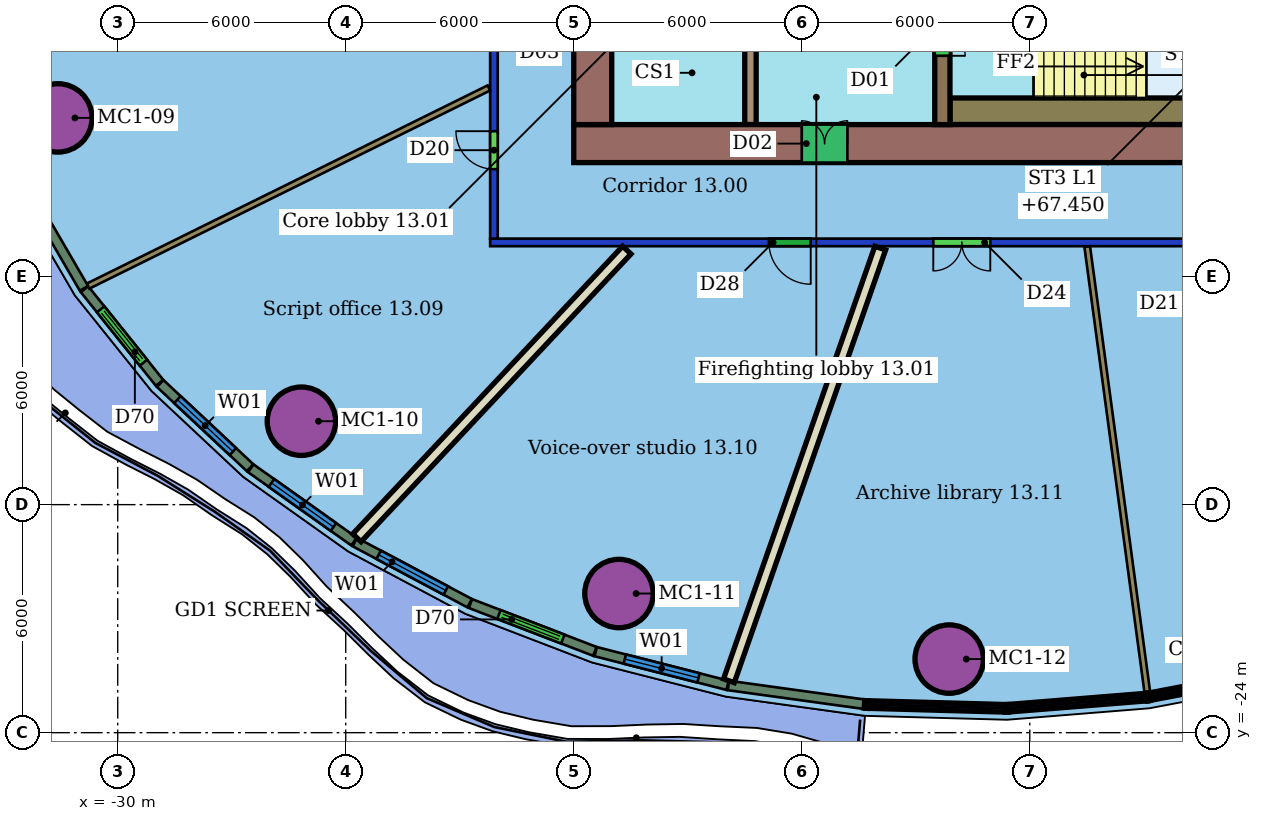
"""IFC4 building model, lengths in metres.
Left out: names, types, materials, properties, quantities, classifications, styles, units other than length and angle.
Written with IfcOpenShell. Run it as: python <this file> out.ifc"""

import sys

from ifc_helpers import new_model, si_unit, direction, frame, frame_2d, origin, origin_2d, place, context, subcontext, project, spatial, rectangle, hollow_circle, extrude, element, fill, save


model = new_model("IFC4")
c1 = context("Model", 3, precision=1e-05, world=origin(), true_north=direction((0.0, 1.0)))
c2 = subcontext(c1, "Body", "Model", "MODEL_VIEW")
j1 = project(units=[si_unit("LENGTHUNIT", "METRE"), si_unit("PLANEANGLEUNIT", "RADIAN")], contexts=[c1])
p1 = place(None, origin())
s1 = spatial("IfcSite", under=j1, at=p1, CompositionType="ELEMENT")
p2 = place(p1, origin())
s2 = spatial("IfcBuilding", under=s1, at=p2, CompositionType="ELEMENT")
p3 = place(p2, frame((0.0, 0.0, 65.6)))
s3 = spatial("IfcBuildingStorey", under=s2, at=p3, CompositionType="ELEMENT", Elevation=65.6)
for number, where, z_axis, x_axis in (
    (1, (-31.575, -7.824, 0.0), (0.0, 0.0, 1.0), (1.0, 0.0, 0.0)),
    (2, (-25.166, -15.805, 0.0), (0.0, 0.0, 1.0), (1.0, 0.0, 0.0)),
    (3, (-16.81, -20.339, 0.0), (0.0, 0.0, 1.0), (1.0, 0.0, 0.0)),
    (4, (-8.121, -22.064, 0.0), (0.0, 0.0, 1.0), (1.0, 0.0, 0.0)),
):
    element("IfcColumn", number, at=place(p3, frame(where, z_axis=z_axis, x_axis=x_axis)), inside=s3, PredefinedType="COLUMN", context=c2, shape_type="SweptSolid", body=[
        extrude(hollow_circle(Radius=0.9, WallThickness=0.06, at=origin_2d()), origin(), (0.0, 0.0, 1.0), 3.55),
    ])
p4 = place(p3, frame((8.2, -11.1, 0.0), z_axis=(0.0, 0.0, 1.0), x_axis=(-1.0, 0.0, 0.0)))
e5 = element("IfcWall", 5, at=p4, inside=s3, PredefinedType="PARTITIONING", context=c2, shape_type="SweptSolid", body=[
    extrude(rectangle(XDim=28.4, YDim=0.2, at=frame_2d((14.2, 0.0))), origin(), (0.0, 0.0, 1.0), 2.85),
])
p5 = place(p4, frame((19.964, 0.0, 0.0)))
e6 = element("IfcOpeningElement", 6, at=p5, cuts=e5, PredefinedType="OPENING", context=c2, shape_type="SweptSolid", body=[
    extrude(rectangle(XDim=1.1, YDim=2.1, at=frame_2d((0.55, 1.05))), frame((0.0, 0.11, 0.0), z_axis=(0.0, -1.0, 0.0), x_axis=(1.0, 0.0, 0.0)), (0.0, 0.0, 1.0), 0.22),
])
p6 = place(p4, frame((15.239, 0.0, 0.0)))
e7 = element("IfcOpeningElement", 7, at=p6, cuts=e5, PredefinedType="OPENING", context=c2, shape_type="SweptSolid", body=[
    extrude(rectangle(XDim=1.5, YDim=2.1, at=frame_2d((0.75, 1.05))), frame((0.0, 0.11, 0.0), z_axis=(0.0, -1.0, 0.0), x_axis=(1.0, 0.0, 0.0)), (0.0, 0.0, 1.0), 0.22),
])
p7 = place(p4, frame((7.453, 0.0, 0.0)))
e8 = element("IfcOpeningElement", 8, at=p7, cuts=e5, PredefinedType="OPENING", context=c2, shape_type="SweptSolid", body=[
    extrude(rectangle(XDim=1.8, YDim=2.1, at=frame_2d((0.9, 1.05))), frame((0.0, 0.11, 0.0), z_axis=(0.0, -1.0, 0.0), x_axis=(1.0, 0.0, 0.0)), (0.0, 0.0, 1.0), 0.22),
])
p8 = place(p3, frame((-20.1, -11.0, 0.0), z_axis=(0.0, 0.0, 1.0), x_axis=(0.0, 1.0, 0.0)))
e9 = element("IfcWall", 9, at=p8, inside=s3, PredefinedType="PARTITIONING", context=c2, shape_type="SweptSolid", body=[
    extrude(rectangle(XDim=22.0, YDim=0.2, at=frame_2d((11.0, 0.0))), origin(), (0.0, 0.0, 1.0), 2.85),
])
p9 = place(p8, frame((18.78, 0.0, 0.0)))
e10 = element("IfcOpeningElement", 10, at=p9, cuts=e9, PredefinedType="OPENING", context=c2, shape_type="SweptSolid", body=[
    extrude(rectangle(XDim=0.9, YDim=2.1, at=frame_2d((0.45, 1.05))), frame((0.0, 0.11, 0.0), z_axis=(0.0, -1.0, 0.0), x_axis=(1.0, 0.0, 0.0)), (0.0, 0.0, 1.0), 0.22),
])
p10 = place(p8, frame((14.403, 0.0, 0.0)))
e11 = element("IfcOpeningElement", 11, at=p10, cuts=e9, PredefinedType="OPENING", context=c2, shape_type="SweptSolid", body=[
    extrude(rectangle(XDim=1.1, YDim=2.1, at=frame_2d((0.55, 1.05))), frame((0.0, 0.11, 0.0), z_axis=(0.0, -1.0, 0.0), x_axis=(1.0, 0.0, 0.0)), (0.0, 0.0, 1.0), 0.22),
])
p11 = place(p8, frame((5.9, 0.0, 0.0)))
e12 = element("IfcOpeningElement", 12, at=p11, cuts=e9, PredefinedType="OPENING", context=c2, shape_type="SweptSolid", body=[
    extrude(rectangle(XDim=0.9, YDim=2.1, at=frame_2d((0.45, 1.05))), frame((0.0, 0.11, 0.0), z_axis=(0.0, -1.0, 0.0), x_axis=(1.0, 0.0, 0.0)), (0.0, 0.0, 1.0), 0.22),
])
p12 = place(p8, frame((1.826, 0.0, 0.0)))
e13 = element("IfcOpeningElement", 13, at=p12, cuts=e9, PredefinedType="OPENING", context=c2, shape_type="SweptSolid", body=[
    extrude(rectangle(XDim=1.0, YDim=2.1, at=frame_2d((0.5, 1.05))), frame((0.0, 0.11, 0.0), z_axis=(0.0, -1.0, 0.0), x_axis=(1.0, 0.0, 0.0)), (0.0, 0.0, 1.0), 0.22),
])
p13 = place(p3, frame((-30.78, -12.25, 0.0), z_axis=(0.0, 0.0, 1.0), x_axis=(0.89644340997, 0.443158225379, 0.0)))
e14 = element("IfcWall", 14, at=p13, inside=s3, PredefinedType="PARTITIONING", context=c2, shape_type="SweptSolid", body=[
    extrude(rectangle(XDim=11.765, YDim=0.15, at=frame_2d((5.882, 0.0))), origin(), (0.0, 0.0, 1.0), 3.55),
])
p14 = place(p3, frame((-23.706, -18.873, 0.0), z_axis=(0.0, 0.0, 1.0), x_axis=(0.684203954535, 0.729290716106, 0.0)))
e15 = element("IfcWall", 15, at=p14, inside=s3, PredefinedType="PARTITIONING", context=c2, shape_type="SweptSolid", body=[
    extrude(rectangle(XDim=10.38, YDim=0.3, at=frame_2d((5.19, 0.0))), origin(), (0.0, 0.0, 1.0), 3.55),
])
p15 = place(p3, frame((-13.917, -22.634, 0.0), z_axis=(0.0, 0.0, 1.0), x_axis=(0.330154755406, 0.943926817864, 0.0)))
e16 = element("IfcWall", 16, at=p15, inside=s3, PredefinedType="PARTITIONING", context=c2, shape_type="SweptSolid", body=[
    extrude(rectangle(XDim=12.061, YDim=0.3, at=frame_2d((6.03, 0.0))), origin(), (0.0, 0.0, 1.0), 3.55),
])
p16 = place(p3, frame((-2.907, -22.937, 0.0), z_axis=(0.0, 0.0, 1.0), x_axis=(-0.133632581672, 0.99103094458, 0.0)))
e17 = element("IfcWall", 17, at=p16, inside=s3, PredefinedType="PARTITIONING", context=c2, shape_type="SweptSolid", body=[
    extrude(rectangle(XDim=11.833, YDim=0.15, at=frame_2d((5.917, 0.0))), origin(), (0.0, 0.0, 1.0), 3.55),
])
p17 = place(p3, frame((-32.421, -9.676, 0.0), z_axis=(0.0, 0.0, 1.0), x_axis=(0.502779258101, -0.864414841163, 0.0)))
e18 = element("IfcWall", 18, at=p17, inside=s3, PredefinedType="SOLIDWALL", context=c2, shape_type="SweptSolid", body=[
    extrude(rectangle(XDim=3.046, YDim=0.25, at=frame_2d((1.523, 0.0))), origin(), (0.0, 0.0, 1.0), 3.15),
])
p18 = place(p3, frame((-30.874, -12.331, 0.0), z_axis=(0.0, 0.0, 1.0), x_axis=(0.625543346061, -0.780189414308, 0.0)))
e19 = element("IfcWall", 19, at=p18, inside=s3, PredefinedType="SOLIDWALL", context=c2, shape_type="SweptSolid", body=[
    extrude(rectangle(XDim=3.157, YDim=0.25, at=frame_2d((1.579, 0.0))), origin(), (0.0, 0.0, 1.0), 3.15),
])
p19 = place(p18, frame((0.679, 0.0, 0.0)))
e20 = element("IfcOpeningElement", 20, at=p19, cuts=e19, PredefinedType="OPENING", context=c2, shape_type="SweptSolid", body=[
    extrude(rectangle(XDim=1.8, YDim=2.4, at=frame_2d((0.9, 1.2))), frame((0.0, 0.135, 0.0), z_axis=(0.0, -1.0, 0.0), x_axis=(1.0, 0.0, 0.0)), (0.0, 0.0, 1.0), 0.27),
])
p20 = place(p3, frame((-28.882, -14.813, 0.0), z_axis=(0.0, 0.0, 1.0), x_axis=(0.729856637525, -0.68360024039, 0.0)))
e21 = element("IfcWall", 21, at=p20, inside=s3, PredefinedType="SOLIDWALL", context=c2, shape_type="SweptSolid", body=[
    extrude(rectangle(XDim=3.241, YDim=0.25, at=frame_2d((1.62, 0.0))), origin(), (0.0, 0.0, 1.0), 3.15),
])
p21 = place(p20, frame((0.62, 0.0, 0.8)))
e22 = element("IfcOpeningElement", 22, at=p21, cuts=e21, PredefinedType="OPENING", context=c2, shape_type="SweptSolid", body=[
    extrude(rectangle(XDim=2.0, YDim=2.2, at=frame_2d((1.0, 1.1))), frame((0.0, 0.135, 0.0), z_axis=(0.0, -1.0, 0.0), x_axis=(1.0, 0.0, 0.0)), (0.0, 0.0, 1.0), 0.27),
])
p22 = place(p3, frame((-26.497, -17.044, 0.0), z_axis=(0.0, 0.0, 1.0), x_axis=(0.815374335275, -0.578934101064, 0.0)))
e23 = element("IfcWall", 23, at=p22, inside=s3, PredefinedType="SOLIDWALL", context=c2, shape_type="SweptSolid", body=[
    extrude(rectangle(XDim=3.331, YDim=0.25, at=frame_2d((1.666, 0.0))), origin(), (0.0, 0.0, 1.0), 3.15),
])
p23 = place(p22, frame((0.666, 0.0, 0.8)))
e24 = element("IfcOpeningElement", 24, at=p23, cuts=e23, PredefinedType="OPENING", context=c2, shape_type="SweptSolid", body=[
    extrude(rectangle(XDim=2.0, YDim=2.2, at=frame_2d((1.0, 1.1))), frame((0.0, 0.135, 0.0), z_axis=(0.0, -1.0, 0.0), x_axis=(1.0, 0.0, 0.0)), (0.0, 0.0, 1.0), 0.27),
])
p24 = place(p3, frame((-23.761, -18.985, 0.0), z_axis=(0.0, 0.0, 1.0), x_axis=(0.882781118704, -0.469784521308, 0.0)))
e25 = element("IfcWall", 25, at=p24, inside=s3, PredefinedType="SOLIDWALL", context=c2, shape_type="SweptSolid", body=[
    extrude(rectangle(XDim=3.422, YDim=0.25, at=frame_2d((1.711, 0.0))), origin(), (0.0, 0.0, 1.0), 3.15),
])
p25 = place(p24, frame((0.711, 0.0, 0.8)))
e26 = element("IfcOpeningElement", 26, at=p25, cuts=e25, PredefinedType="OPENING", context=c2, shape_type="SweptSolid", body=[
    extrude(rectangle(XDim=2.0, YDim=2.2, at=frame_2d((1.0, 1.1))), frame((0.0, 0.135, 0.0), z_axis=(0.0, -1.0, 0.0), x_axis=(1.0, 0.0, 0.0)), (0.0, 0.0, 1.0), 0.27),
])
p26 = place(p3, frame((-20.719, -20.603, 0.0), z_axis=(0.0, 0.0, 1.0), x_axis=(0.933440649203, -0.358731869808, 0.0)))
e27 = element("IfcWall", 27, at=p26, inside=s3, PredefinedType="SOLIDWALL", context=c2, shape_type="SweptSolid", body=[
    extrude(rectangle(XDim=3.508, YDim=0.25, at=frame_2d((1.754, 0.0))), origin(), (0.0, 0.0, 1.0), 3.15),
])
p27 = place(p26, frame((0.804, 0.0, 0.0)))
e28 = element("IfcOpeningElement", 28, at=p27, cuts=e27, PredefinedType="OPENING", context=c2, shape_type="SweptSolid", body=[
    extrude(rectangle(XDim=1.8, YDim=2.4, at=frame_2d((0.9, 1.2))), frame((0.0, 0.135, 0.0), z_axis=(0.0, -1.0, 0.0), x_axis=(1.0, 0.0, 0.0)), (0.0, 0.0, 1.0), 0.27),
])
p28 = place(p3, frame((-17.423, -21.868, 0.0), z_axis=(0.0, 0.0, 1.0), x_axis=(0.968907631907, -0.24742271689, 0.0)))
e29 = element("IfcWall", 29, at=p28, inside=s3, PredefinedType="SOLIDWALL", context=c2, shape_type="SweptSolid", body=[
    extrude(rectangle(XDim=3.583, YDim=0.25, at=frame_2d((1.792, 0.0))), origin(), (0.0, 0.0, 1.0), 3.15),
])
p29 = place(p28, frame((0.791, 0.0, 0.8)))
e30 = element("IfcOpeningElement", 30, at=p29, cuts=e29, PredefinedType="OPENING", context=c2, shape_type="SweptSolid", body=[
    extrude(rectangle(XDim=2.0, YDim=2.2, at=frame_2d((1.0, 1.1))), frame((0.0, 0.135, 0.0), z_axis=(0.0, -1.0, 0.0), x_axis=(1.0, 0.0, 0.0)), (0.0, 0.0, 1.0), 0.27),
])
p30 = place(p3, frame((-13.93, -22.758, 0.0), z_axis=(0.0, 0.0, 1.0), x_axis=(0.990592925524, -0.136841718429, 0.0)))
e31 = element("IfcWall", 31, at=p30, inside=s3, PredefinedType="SOLIDWALL", context=c2, shape_type="SweptSolid", body=[
    extrude(rectangle(XDim=3.599, YDim=0.25, at=frame_2d((1.799, 0.0))), origin(), (0.0, 0.0, 1.0), 3.15),
])
p31 = place(p3, frame((-18.0, -8.5, 0.0), z_axis=(0.0, 0.0, 1.0), x_axis=(1.0, 0.0, 0.0)))
e32 = element("IfcWall", 32, at=p31, inside=s3, PredefinedType="SHEAR", context=c2, shape_type="SweptSolid", body=[
    extrude(rectangle(XDim=24.0, YDim=1.0, at=frame_2d((12.0, 0.0))), origin(), (0.0, 0.0, 1.0), 3.4),
])
p32 = place(p31, frame((6.0, 0.0, 0.0)))
e33 = element("IfcOpeningElement", 33, at=p32, cuts=e32, PredefinedType="OPENING", context=c2, shape_type="SweptSolid", body=[
    extrude(rectangle(XDim=1.2, YDim=2.1, at=frame_2d((0.6, 1.05))), frame((0.0, 0.51, 0.0), z_axis=(0.0, -1.0, 0.0), x_axis=(1.0, 0.0, 0.0)), (0.0, 0.0, 1.0), 1.02),
])
p33 = place(p3, frame((-17.5, 8.0, 0.0), z_axis=(0.0, 0.0, 1.0), x_axis=(0.0, -1.0, 0.0)))
e34 = element("IfcWall", 34, at=p33, inside=s3, PredefinedType="SHEAR", context=c2, shape_type="SweptSolid", body=[
    extrude(rectangle(XDim=16.0, YDim=1.0, at=frame_2d((8.0, 0.0))), origin(), (0.0, 0.0, 1.0), 3.4),
])
p34 = place(p33, frame((11.9, 0.0, 0.0)))
e35 = element("IfcOpeningElement", 35, at=p34, cuts=e34, PredefinedType="OPENING", context=c2, shape_type="SweptSolid", body=[
    extrude(rectangle(XDim=1.2, YDim=2.1, at=frame_2d((0.6, 1.05))), frame((0.0, 0.51, 0.0), z_axis=(0.0, -1.0, 0.0), x_axis=(1.0, 0.0, 0.0)), (0.0, 0.0, 1.0), 1.02),
])
p35 = place(p33, frame((2.9, 0.0, 0.0)))
e36 = element("IfcOpeningElement", 36, at=p35, cuts=e34, PredefinedType="OPENING", context=c2, shape_type="SweptSolid", body=[
    extrude(rectangle(XDim=1.2, YDim=2.1, at=frame_2d((0.6, 1.05))), frame((0.0, 0.51, 0.0), z_axis=(0.0, -1.0, 0.0), x_axis=(1.0, 0.0, 0.0)), (0.0, 0.0, 1.0), 1.02),
])
p36 = place(p3, frame((-13.35, 8.0, 0.0), z_axis=(0.0, 0.0, 1.0), x_axis=(0.0, -1.0, 0.0)))
e37 = element("IfcWall", 37, at=p36, inside=s3, PredefinedType="SHEAR", context=c2, shape_type="SweptSolid", body=[
    extrude(rectangle(XDim=16.0, YDim=0.3, at=frame_2d((8.0, 0.0))), origin(), (0.0, 0.0, 1.0), 3.4),
])
p37 = place(p36, frame((7.25, 0.0, 0.0)))
e38 = element("IfcOpeningElement", 38, at=p37, cuts=e37, PredefinedType="OPENING", context=c2, shape_type="SweptSolid", body=[
    extrude(rectangle(XDim=1.5, YDim=2.1, at=frame_2d((0.75, 1.05))), frame((0.0, 0.16, 0.0), z_axis=(0.0, -1.0, 0.0), x_axis=(1.0, 0.0, 0.0)), (0.0, 0.0, 1.0), 0.32),
])
p38 = place(p3, frame((-8.3, -3.88, 0.0), z_axis=(0.0, 0.0, 1.0), x_axis=(0.0, -1.0, 0.0)))
e39 = element("IfcWall", 39, at=p38, inside=s3, PredefinedType="SHEAR", context=c2, shape_type="SweptSolid", body=[
    extrude(rectangle(XDim=4.12, YDim=0.4, at=frame_2d((2.06, 0.0))), origin(), (0.0, 0.0, 1.0), 3.4),
])
p39 = place(p38, frame((1.11, 0.0, 0.0)))
e40 = element("IfcOpeningElement", 40, at=p39, cuts=e39, PredefinedType="OPENING", context=c2, shape_type="SweptSolid", body=[
    extrude(rectangle(XDim=1.2, YDim=2.1, at=frame_2d((0.6, 1.05))), frame((0.0, 0.21, 0.0), z_axis=(0.0, -1.0, 0.0), x_axis=(1.0, 0.0, 0.0)), (0.0, 0.0, 1.0), 0.42),
])
p40 = place(p3, frame((-8.1, -7.65, 0.0), z_axis=(0.0, 0.0, 1.0), x_axis=(1.0, 0.0, 0.0)))
e41 = element("IfcWall", 41, at=p40, inside=s3, PredefinedType="SHEAR", context=c2, shape_type="SweptSolid", body=[
    extrude(rectangle(XDim=7.05, YDim=0.7, at=frame_2d((3.525, 0.0))), origin(), (0.0, 0.0, 1.0), 3.4),
])
p41 = place(p12, origin())
e42 = element("IfcDoor", 42, at=p41, inside=s3, OperationType="SINGLE_SWING_RIGHT", PredefinedType="DOOR", context=c2, shape_type="SweptSolid", body=[
    extrude(rectangle(XDim=1.0, YDim=2.1, at=frame_2d((0.5, 1.05))), frame((0.0, 0.025, 0.0), z_axis=(0.0, -1.0, 0.0), x_axis=(1.0, 0.0, 0.0)), (0.0, 0.0, 1.0), 0.05),
])
fill(e13, e42)
p42 = place(p5, origin())
e43 = element("IfcDoor", 43, at=p42, inside=s3, OperationType="SINGLE_SWING_LEFT", PredefinedType="DOOR", context=c2, shape_type="SweptSolid", body=[
    extrude(rectangle(XDim=1.1, YDim=2.1, at=frame_2d((0.55, 1.05))), frame((0.0, 0.025, 0.0), z_axis=(0.0, -1.0, 0.0), x_axis=(1.0, 0.0, 0.0)), (0.0, 0.0, 1.0), 0.05),
])
fill(e6, e43)
p43 = place(p6, origin())
e44 = element("IfcDoor", 44, at=p43, inside=s3, OperationType="DOUBLE_DOOR_SINGLE_SWING", PredefinedType="DOOR", context=c2, shape_type="SweptSolid", body=[
    extrude(rectangle(XDim=1.5, YDim=2.1, at=frame_2d((0.75, 1.05))), frame((0.0, 0.025, 0.0), z_axis=(0.0, -1.0, 0.0), x_axis=(1.0, 0.0, 0.0)), (0.0, 0.0, 1.0), 0.05),
])
fill(e7, e44)
p44 = place(p19, origin())
e45 = element("IfcDoor", 45, at=p44, inside=s3, OperationType="DOUBLE_DOOR_SLIDING", PredefinedType="DOOR", context=c2, shape_type="SweptSolid", body=[
    extrude(rectangle(XDim=1.8, YDim=2.4, at=frame_2d((0.9, 1.2))), frame((0.0, 0.025, 0.0), z_axis=(0.0, -1.0, 0.0), x_axis=(1.0, 0.0, 0.0)), (0.0, 0.0, 1.0), 0.05),
])
fill(e20, e45)
p45 = place(p21, origin())
e46 = element("IfcWindow", 46, at=p45, inside=s3, PartitioningType="SINGLE_PANEL", PredefinedType="WINDOW", context=c2, shape_type="SweptSolid", body=[
    extrude(rectangle(XDim=2.0, YDim=2.2, at=frame_2d((1.0, 1.1))), frame((0.0, 0.03, 0.0), z_axis=(0.0, -1.0, 0.0), x_axis=(1.0, 0.0, 0.0)), (0.0, 0.0, 1.0), 0.06),
])
fill(e22, e46)
p46 = place(p23, origin())
e47 = element("IfcWindow", 47, at=p46, inside=s3, PartitioningType="SINGLE_PANEL", PredefinedType="WINDOW", context=c2, shape_type="SweptSolid", body=[
    extrude(rectangle(XDim=2.0, YDim=2.2, at=frame_2d((1.0, 1.1))), frame((0.0, 0.03, 0.0), z_axis=(0.0, -1.0, 0.0), x_axis=(1.0, 0.0, 0.0)), (0.0, 0.0, 1.0), 0.06),
])
fill(e24, e47)
p47 = place(p25, origin())
e48 = element("IfcWindow", 48, at=p47, inside=s3, PartitioningType="SINGLE_PANEL", PredefinedType="WINDOW", context=c2, shape_type="SweptSolid", body=[
    extrude(rectangle(XDim=2.0, YDim=2.2, at=frame_2d((1.0, 1.1))), frame((0.0, 0.03, 0.0), z_axis=(0.0, -1.0, 0.0), x_axis=(1.0, 0.0, 0.0)), (0.0, 0.0, 1.0), 0.06),
])
fill(e26, e48)
p48 = place(p27, origin())
e49 = element("IfcDoor", 49, at=p48, inside=s3, OperationType="DOUBLE_DOOR_SLIDING", PredefinedType="DOOR", context=c2, shape_type="SweptSolid", body=[
    extrude(rectangle(XDim=1.8, YDim=2.4, at=frame_2d((0.9, 1.2))), frame((0.0, 0.025, 0.0), z_axis=(0.0, -1.0, 0.0), x_axis=(1.0, 0.0, 0.0)), (0.0, 0.0, 1.0), 0.05),
])
fill(e28, e49)
p49 = place(p29, origin())
e50 = element("IfcWindow", 50, at=p49, inside=s3, PartitioningType="SINGLE_PANEL", PredefinedType="WINDOW", context=c2, shape_type="SweptSolid", body=[
    extrude(rectangle(XDim=2.0, YDim=2.2, at=frame_2d((1.0, 1.1))), frame((0.0, 0.03, 0.0), z_axis=(0.0, -1.0, 0.0), x_axis=(1.0, 0.0, 0.0)), (0.0, 0.0, 1.0), 0.06),
])
fill(e30, e50)
p50 = place(p32, origin())
e51 = element("IfcDoor", 51, at=p50, inside=s3, OperationType="DOUBLE_DOOR_SINGLE_SWING", PredefinedType="NOTDEFINED", context=c2, shape_type="SweptSolid", body=[
    extrude(rectangle(XDim=1.2, YDim=2.1, at=frame_2d((0.6, 1.05))), frame((0.0, 0.025, 0.0), z_axis=(0.0, -1.0, 0.0), x_axis=(1.0, 0.0, 0.0)), (0.0, 0.0, 1.0), 0.05),
])
fill(e33, e51)
p51 = place(p39, origin())
e52 = element("IfcDoor", 52, at=p51, inside=s3, OperationType="DOUBLE_DOOR_SINGLE_SWING", PredefinedType="NOTDEFINED", context=c2, shape_type="SweptSolid", body=[
    extrude(rectangle(XDim=1.2, YDim=2.1, at=frame_2d((0.6, 1.05))), frame((0.0, 0.025, 0.0), z_axis=(0.0, -1.0, 0.0), x_axis=(1.0, 0.0, 0.0)), (0.0, 0.0, 1.0), 0.05),
])
fill(e40, e52)
save(model, sys.argv[1])
